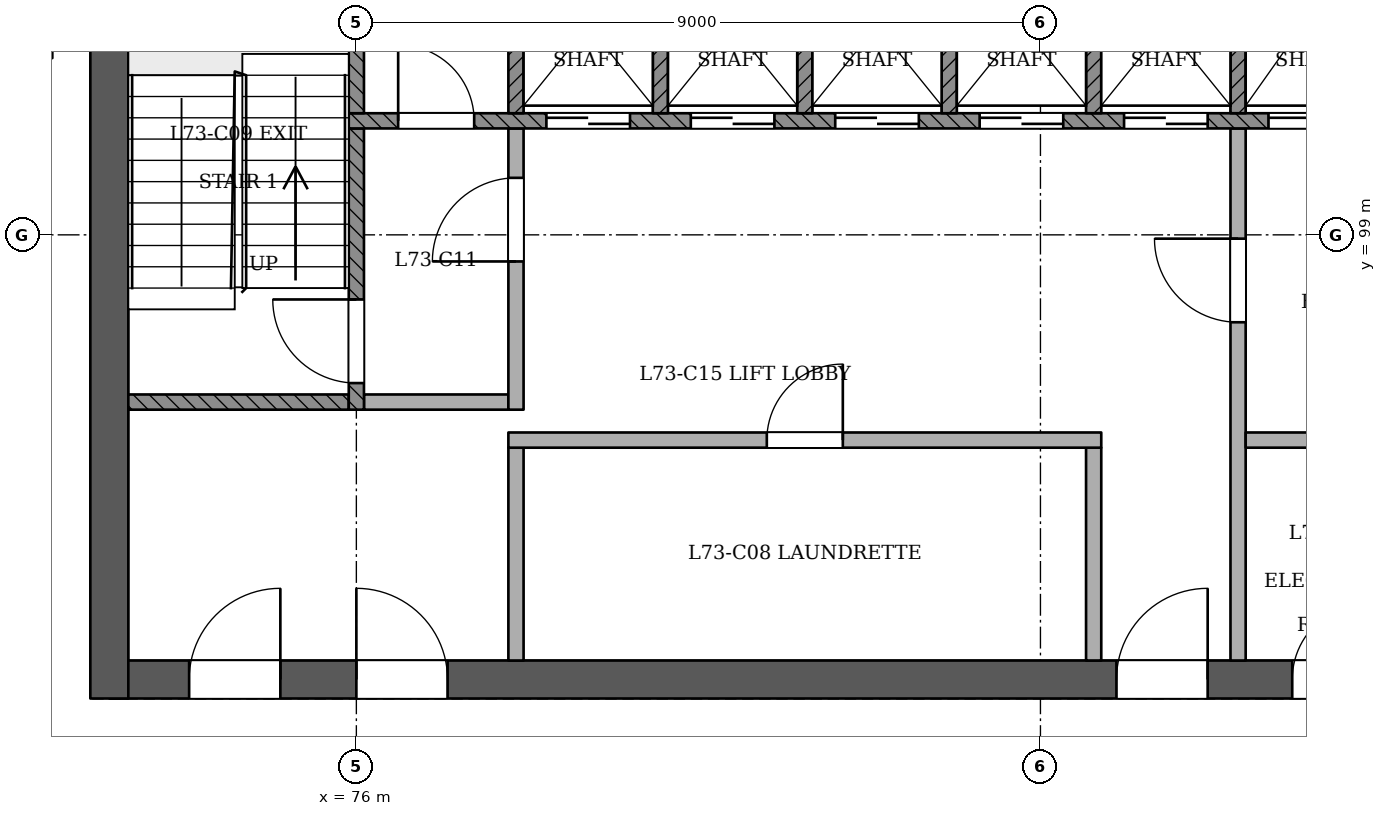
"""IFC4 building model, lengths in metres.
Left out: names, types, materials, properties, quantities, classifications, styles, units other than length and angle.
Written with IfcOpenShell. Run it as: python <this file> out.ifc"""

import sys

from ifc_helpers import new_model, si_unit, direction, frame, frame_2d, origin, place, context, subcontext, project, spatial, rectangle, extrude, element, fill, save


model = new_model("IFC4")
c1 = context("Model", 3, precision=1e-05, world=origin(), true_north=direction((0.0, 1.0)))
c2 = subcontext(c1, "Body", "Model", "MODEL_VIEW")
j1 = project(units=[si_unit("LENGTHUNIT", "METRE"), si_unit("PLANEANGLEUNIT", "RADIAN")], contexts=[c1])
p1 = place(None, origin())
s1 = spatial("IfcSite", under=j1, at=p1, CompositionType="ELEMENT")
p2 = place(p1, origin())
s2 = spatial("IfcBuilding", under=s1, at=p2, CompositionType="ELEMENT")
p3 = place(p2, frame((0.0, 0.0, 282.4)))
s3 = spatial("IfcBuildingStorey", under=s2, at=p3, CompositionType="ELEMENT", Elevation=282.4)
p4 = place(p3, frame((72.75, 93.15, 0.0), z_axis=(0.0, 0.0, 1.0), x_axis=(1.0, 0.0, 0.0)))
e1 = element("IfcWall", 1, at=p4, inside=s3, PredefinedType="SHEAR", context=c2, shape_type="SweptSolid", body=[
    extrude(rectangle(XDim=24.75, YDim=0.5, at=frame_2d((12.375, 0.0))), origin(), (0.0, 0.0, 1.0), 3.6),
])
p5 = place(p4, frame((1.05, 0.0, 0.0)))
e2 = element("IfcOpeningElement", 2, at=p5, cuts=e1, PredefinedType="OPENING", context=c2, shape_type="SweptSolid", body=[
    extrude(rectangle(XDim=1.2, YDim=2.1, at=frame_2d((0.6, 1.05))), frame((0.0, 0.26, 0.0), z_axis=(0.0, -1.0, 0.0), x_axis=(1.0, 0.0, 0.0)), (0.0, 0.0, 1.0), 0.521),
])
p6 = place(p4, frame((3.25, 0.0, 0.0)))
e3 = element("IfcOpeningElement", 3, at=p6, cuts=e1, PredefinedType="OPENING", context=c2, shape_type="SweptSolid", body=[
    extrude(rectangle(XDim=1.2, YDim=2.1, at=frame_2d((0.6, 1.05))), frame((0.0, 0.26, 0.0), z_axis=(0.0, -1.0, 0.0), x_axis=(1.0, 0.0, 0.0)), (0.0, 0.0, 1.0), 0.521),
])
p7 = place(p4, frame((13.25, 0.0, 0.0)))
e4 = element("IfcOpeningElement", 4, at=p7, cuts=e1, PredefinedType="OPENING", context=c2, shape_type="SweptSolid", body=[
    extrude(rectangle(XDim=1.2, YDim=2.1, at=frame_2d((0.6, 1.05))), frame((0.0, 0.26, 0.0), z_axis=(0.0, -1.0, 0.0), x_axis=(1.0, 0.0, 0.0)), (0.0, 0.0, 1.0), 0.521),
])
p8 = place(p4, frame((15.562, 0.0, 0.0)))
e5 = element("IfcOpeningElement", 5, at=p8, cuts=e1, PredefinedType="OPENING", context=c2, shape_type="SweptSolid", body=[
    extrude(rectangle(XDim=1.0, YDim=2.1, at=frame_2d((0.5, 1.05))), frame((0.0, 0.26, 0.0), z_axis=(0.0, -1.0, 0.0), x_axis=(1.0, 0.0, 0.0)), (0.0, 0.0, 1.0), 0.521),
])
p9 = place(p4, frame((19.0, 0.0, 0.0)))
e6 = element("IfcOpeningElement", 6, at=p9, cuts=e1, PredefinedType="OPENING", context=c2, shape_type="SweptSolid", body=[
    extrude(rectangle(XDim=1.0, YDim=2.1, at=frame_2d((0.5, 1.05))), frame((0.0, 0.26, 0.0), z_axis=(0.0, -1.0, 0.0), x_axis=(1.0, 0.0, 0.0)), (0.0, 0.0, 1.0), 0.521),
])
p10 = place(p4, frame((22.538, 0.0, 0.0)))
e7 = element("IfcOpeningElement", 7, at=p10, cuts=e1, PredefinedType="OPENING", context=c2, shape_type="SweptSolid", body=[
    extrude(rectangle(XDim=1.0, YDim=2.1, at=frame_2d((0.5, 1.05))), frame((0.0, 0.26, 0.0), z_axis=(0.0, -1.0, 0.0), x_axis=(1.0, 0.0, 0.0)), (0.0, 0.0, 1.0), 0.521),
])
p11 = place(p3, frame((72.75, 103.65, 0.0), z_axis=(0.0, 0.0, 1.0), x_axis=(0.0, -1.0, 0.0)))
e8 = element("IfcWall", 8, at=p11, inside=s3, PredefinedType="SHEAR", context=c2, shape_type="SweptSolid", body=[
    extrude(rectangle(XDim=10.75, YDim=0.5, at=frame_2d((5.375, 0.0))), origin(), (0.0, 0.0, 1.0), 3.6),
])
p12 = place(p3, frame((72.0, 101.4, 0.0), z_axis=(0.0, 0.0, 1.0), x_axis=(-1.0, 0.0, 0.0)))
e9 = element("IfcWall", 9, at=p12, inside=s3, PredefinedType="PARTITIONING", context=c2, shape_type="SweptSolid", body=[
    extrude(rectangle(XDim=1.8, YDim=0.15, at=frame_2d((0.9, 0.0))), origin(), (0.0, 0.0, 1.0), 3.3),
])
p13 = place(p12, frame((0.55, 0.0, 0.0)))
e10 = element("IfcOpeningElement", 10, at=p13, cuts=e9, PredefinedType="OPENING", context=c2, shape_type="SweptSolid", body=[
    extrude(rectangle(XDim=1.0, YDim=2.1, at=frame_2d((0.5, 1.05))), frame((0.0, 0.085, 0.0), z_axis=(0.0, -1.0, 0.0), x_axis=(1.0, 0.0, 0.0)), (0.0, 0.0, 1.0), 0.171),
])
for number, where, z_axis, x_axis in (
    (11, (78.1, 93.4, 0.0), (0.0, 0.0, 1.0), (0.0, 1.0, 0.0)),
    (12, (85.7, 93.4, 0.0), (0.0, 0.0, 1.0), (0.0, 1.0, 0.0)),
):
    element("IfcWall", number, at=place(p3, frame(where, z_axis=z_axis, x_axis=x_axis)), inside=s3, PredefinedType="PARTITIONING", context=c2, shape_type="SweptSolid", body=[
        extrude(rectangle(XDim=2.8, YDim=0.2, at=frame_2d((1.4, 0.0))), origin(), (0.0, 0.0, 1.0), 3.3),
    ])
p14 = place(p3, frame((87.6, 93.4, 0.0), z_axis=(0.0, 0.0, 1.0), x_axis=(0.0, 1.0, 0.0)))
e13 = element("IfcWall", 13, at=p14, inside=s3, PredefinedType="PARTITIONING", context=c2, shape_type="SweptSolid", body=[
    extrude(rectangle(XDim=7.0, YDim=0.2, at=frame_2d((3.5, 0.0))), origin(), (0.0, 0.0, 1.0), 3.3),
])
p15 = place(p14, frame((4.45, 0.0, 0.0)))
e14 = element("IfcOpeningElement", 14, at=p15, cuts=e13, PredefinedType="OPENING", context=c2, shape_type="SweptSolid", body=[
    extrude(rectangle(XDim=1.1, YDim=2.1, at=frame_2d((0.55, 1.05))), frame((0.0, 0.11, 0.0), z_axis=(0.0, -1.0, 0.0), x_axis=(1.0, 0.0, 0.0)), (0.0, 0.0, 1.0), 0.221),
])
p16 = place(p3, frame((78.0, 96.3, 0.0), z_axis=(0.0, 0.0, 1.0), x_axis=(1.0, 0.0, 0.0)))
e15 = element("IfcWall", 15, at=p16, inside=s3, PredefinedType="PARTITIONING", context=c2, shape_type="SweptSolid", body=[
    extrude(rectangle(XDim=7.8, YDim=0.2, at=frame_2d((3.9, 0.0))), origin(), (0.0, 0.0, 1.0), 3.3),
])
p17 = place(p16, frame((3.4, 0.0, 0.0)))
e16 = element("IfcOpeningElement", 16, at=p17, cuts=e15, PredefinedType="OPENING", context=c2, shape_type="SweptSolid", body=[
    extrude(rectangle(XDim=1.0, YDim=2.1, at=frame_2d((0.5, 1.05))), frame((0.0, 0.11, 0.0), z_axis=(0.0, -1.0, 0.0), x_axis=(1.0, 0.0, 0.0)), (0.0, 0.0, 1.0), 0.221),
])
p18 = place(p3, frame((87.7, 96.3, 0.0), z_axis=(0.0, 0.0, 1.0), x_axis=(1.0, 0.0, 0.0)))
e17 = element("IfcWall", 17, at=p18, inside=s3, PredefinedType="PARTITIONING", context=c2, shape_type="SweptSolid", body=[
    extrude(rectangle(XDim=3.6, YDim=0.2, at=frame_2d((1.8, 0.0))), origin(), (0.0, 0.0, 1.0), 3.3),
])
p19 = place(p3, frame((73.0, 96.8, 0.0), z_axis=(0.0, 0.0, 1.0), x_axis=(1.0, 0.0, 0.0)))
e18 = element("IfcWall", 18, at=p19, inside=s3, PredefinedType="SOLIDWALL", context=c2, shape_type="SweptSolid", body=[
    extrude(rectangle(XDim=2.9, YDim=0.2, at=frame_2d((1.45, 0.0))), origin(), (0.0, 0.0, 1.0), 3.3),
])
p20 = place(p3, frame((76.0, 96.7, 0.0), z_axis=(0.0, 0.0, 1.0), x_axis=(0.0, 1.0, 0.0)))
e19 = element("IfcWall", 19, at=p20, inside=s3, PredefinedType="SOLIDWALL", context=c2, shape_type="SweptSolid", body=[
    extrude(rectangle(XDim=3.7, YDim=0.2, at=frame_2d((1.85, 0.0))), origin(), (0.0, 0.0, 1.0), 3.3),
])
p21 = place(p20, frame((0.35, 0.0, 0.0)))
e20 = element("IfcOpeningElement", 20, at=p21, cuts=e19, PredefinedType="OPENING", context=c2, shape_type="SweptSolid", body=[
    extrude(rectangle(XDim=1.1, YDim=2.1, at=frame_2d((0.55, 1.05))), frame((0.0, 0.11, 0.0), z_axis=(0.0, -1.0, 0.0), x_axis=(1.0, 0.0, 0.0)), (0.0, 0.0, 1.0), 0.221),
])
p22 = place(p3, frame((76.1, 96.8, 0.0), z_axis=(0.0, 0.0, 1.0), x_axis=(1.0, 0.0, 0.0)))
e21 = element("IfcWall", 21, at=p22, inside=s3, PredefinedType="PARTITIONING", context=c2, shape_type="SweptSolid", body=[
    extrude(rectangle(XDim=1.9, YDim=0.2, at=frame_2d((0.95, 0.0))), origin(), (0.0, 0.0, 1.0), 3.3),
])
p23 = place(p3, frame((78.1, 96.7, 0.0), z_axis=(0.0, 0.0, 1.0), x_axis=(0.0, 1.0, 0.0)))
e22 = element("IfcWall", 22, at=p23, inside=s3, PredefinedType="PARTITIONING", context=c2, shape_type="SweptSolid", body=[
    extrude(rectangle(XDim=3.7, YDim=0.2, at=frame_2d((1.85, 0.0))), origin(), (0.0, 0.0, 1.0), 3.3),
])
p24 = place(p23, frame((1.95, 0.0, 0.0)))
e23 = element("IfcOpeningElement", 23, at=p24, cuts=e22, PredefinedType="OPENING", context=c2, shape_type="SweptSolid", body=[
    extrude(rectangle(XDim=1.1, YDim=2.1, at=frame_2d((0.55, 1.05))), frame((0.0, 0.11, 0.0), z_axis=(0.0, -1.0, 0.0), x_axis=(1.0, 0.0, 0.0)), (0.0, 0.0, 1.0), 0.221),
])
p25 = place(p3, frame((75.9, 100.5, 0.0), z_axis=(0.0, 0.0, 1.0), x_axis=(1.0, 0.0, 0.0)))
e24 = element("IfcWall", 24, at=p25, inside=s3, PredefinedType="SOLIDWALL", context=c2, shape_type="SweptSolid", body=[
    extrude(rectangle(XDim=18.2, YDim=0.2, at=frame_2d((9.1, 0.0))), origin(), (0.0, 0.0, 1.0), 3.3),
])
p26 = place(p25, frame((2.6, 0.0, 0.0)))
e25 = element("IfcOpeningElement", 25, at=p26, cuts=e24, PredefinedType="OPENING", context=c2, shape_type="SweptSolid", body=[
    extrude(rectangle(XDim=1.1, YDim=2.1, at=frame_2d((0.55, 1.05))), frame((0.0, 0.11, 0.0), z_axis=(0.0, -1.0, 0.0), x_axis=(1.0, 0.0, 0.0)), (0.0, 0.0, 1.0), 0.221),
])
p27 = place(p25, frame((4.5, 0.0, 0.0)))
e26 = element("IfcOpeningElement", 26, at=p27, cuts=e24, PredefinedType="OPENING", context=c2, shape_type="SweptSolid", body=[
    extrude(rectangle(XDim=1.1, YDim=2.1, at=frame_2d((0.55, 1.05))), frame((0.0, 0.11, 0.0), z_axis=(0.0, -1.0, 0.0), x_axis=(1.0, 0.0, 0.0)), (0.0, 0.0, 1.0), 0.221),
])
p28 = place(p25, frame((6.4, 0.0, 0.0)))
e27 = element("IfcOpeningElement", 27, at=p28, cuts=e24, PredefinedType="OPENING", context=c2, shape_type="SweptSolid", body=[
    extrude(rectangle(XDim=1.1, YDim=2.1, at=frame_2d((0.55, 1.05))), frame((0.0, 0.11, 0.0), z_axis=(0.0, -1.0, 0.0), x_axis=(1.0, 0.0, 0.0)), (0.0, 0.0, 1.0), 0.221),
])
p29 = place(p25, frame((8.3, 0.0, 0.0)))
e28 = element("IfcOpeningElement", 28, at=p29, cuts=e24, PredefinedType="OPENING", context=c2, shape_type="SweptSolid", body=[
    extrude(rectangle(XDim=1.1, YDim=2.1, at=frame_2d((0.55, 1.05))), frame((0.0, 0.11, 0.0), z_axis=(0.0, -1.0, 0.0), x_axis=(1.0, 0.0, 0.0)), (0.0, 0.0, 1.0), 0.221),
])
p30 = place(p25, frame((10.2, 0.0, 0.0)))
e29 = element("IfcOpeningElement", 29, at=p30, cuts=e24, PredefinedType="OPENING", context=c2, shape_type="SweptSolid", body=[
    extrude(rectangle(XDim=1.1, YDim=2.1, at=frame_2d((0.55, 1.05))), frame((0.0, 0.11, 0.0), z_axis=(0.0, -1.0, 0.0), x_axis=(1.0, 0.0, 0.0)), (0.0, 0.0, 1.0), 0.221),
])
p31 = place(p25, frame((12.1, 0.0, 0.0)))
e30 = element("IfcOpeningElement", 30, at=p31, cuts=e24, PredefinedType="OPENING", context=c2, shape_type="SweptSolid", body=[
    extrude(rectangle(XDim=1.1, YDim=2.1, at=frame_2d((0.55, 1.05))), frame((0.0, 0.11, 0.0), z_axis=(0.0, -1.0, 0.0), x_axis=(1.0, 0.0, 0.0)), (0.0, 0.0, 1.0), 0.221),
])
p32 = place(p25, frame((14.0, 0.0, 0.0)))
e31 = element("IfcOpeningElement", 31, at=p32, cuts=e24, PredefinedType="OPENING", context=c2, shape_type="SweptSolid", body=[
    extrude(rectangle(XDim=1.1, YDim=2.1, at=frame_2d((0.55, 1.05))), frame((0.0, 0.11, 0.0), z_axis=(0.0, -1.0, 0.0), x_axis=(1.0, 0.0, 0.0)), (0.0, 0.0, 1.0), 0.221),
])
p33 = place(p25, frame((0.65, 0.0, 0.0)))
e32 = element("IfcOpeningElement", 32, at=p33, cuts=e24, PredefinedType="OPENING", context=c2, shape_type="SweptSolid", body=[
    extrude(rectangle(XDim=1.0, YDim=2.1, at=frame_2d((0.5, 1.05))), frame((0.0, 0.11, 0.0), z_axis=(0.0, -1.0, 0.0), x_axis=(1.0, 0.0, 0.0)), (0.0, 0.0, 1.0), 0.221),
])
p34 = place(p25, frame((16.3, 0.0, 0.0)))
e33 = element("IfcOpeningElement", 33, at=p34, cuts=e24, PredefinedType="OPENING", context=c2, shape_type="SweptSolid", body=[
    extrude(rectangle(XDim=1.0, YDim=2.1, at=frame_2d((0.5, 1.05))), frame((0.0, 0.11, 0.0), z_axis=(0.0, -1.0, 0.0), x_axis=(1.0, 0.0, 0.0)), (0.0, 0.0, 1.0), 0.221),
])
for number, where, z_axis, x_axis in (
    (34, (76.0, 100.6, 0.0), (0.0, 0.0, 1.0), (0.0, 1.0, 0.0)),
    (35, (78.1, 100.6, 0.0), (0.0, 0.0, 1.0), (0.0, 1.0, 0.0)),
    (36, (80.0, 100.6, 0.0), (0.0, 0.0, 1.0), (0.0, 1.0, 0.0)),
    (37, (81.9, 100.6, 0.0), (0.0, 0.0, 1.0), (0.0, 1.0, 0.0)),
    (38, (83.8, 100.6, 0.0), (0.0, 0.0, 1.0), (0.0, 1.0, 0.0)),
    (39, (85.7, 100.6, 0.0), (0.0, 0.0, 1.0), (0.0, 1.0, 0.0)),
    (40, (87.6, 100.6, 0.0), (0.0, 0.0, 1.0), (0.0, 1.0, 0.0)),
):
    element("IfcWall", number, at=place(p3, frame(where, z_axis=z_axis, x_axis=x_axis)), inside=s3, PredefinedType="SOLIDWALL", context=c2, shape_type="SweptSolid", body=[
        extrude(rectangle(XDim=2.8, YDim=0.2, at=frame_2d((1.4, 0.0))), origin(), (0.0, 0.0, 1.0), 3.3),
    ])
p35 = place(p26, origin())
e41 = element("IfcDoor", 41, at=p35, inside=s3, OperationType="SLIDING_TO_RIGHT", PredefinedType="NOTDEFINED", context=c2, shape_type="SweptSolid", body=[
    extrude(rectangle(XDim=1.1, YDim=2.1, at=frame_2d((0.55, 1.05))), frame((0.0, 0.025, 0.0), z_axis=(0.0, -1.0, 0.0), x_axis=(1.0, 0.0, 0.0)), (0.0, 0.0, 1.0), 0.05),
])
fill(e25, e41)
p36 = place(p27, origin())
e42 = element("IfcDoor", 42, at=p36, inside=s3, OperationType="SLIDING_TO_LEFT", PredefinedType="NOTDEFINED", context=c2, shape_type="SweptSolid", body=[
    extrude(rectangle(XDim=1.1, YDim=2.1, at=frame_2d((0.55, 1.05))), frame((0.0, 0.025, 0.0), z_axis=(0.0, -1.0, 0.0), x_axis=(1.0, 0.0, 0.0)), (0.0, 0.0, 1.0), 0.05),
])
fill(e26, e42)
p37 = place(p28, origin())
e43 = element("IfcDoor", 43, at=p37, inside=s3, OperationType="SLIDING_TO_RIGHT", PredefinedType="NOTDEFINED", context=c2, shape_type="SweptSolid", body=[
    extrude(rectangle(XDim=1.1, YDim=2.1, at=frame_2d((0.55, 1.05))), frame((0.0, 0.025, 0.0), z_axis=(0.0, -1.0, 0.0), x_axis=(1.0, 0.0, 0.0)), (0.0, 0.0, 1.0), 0.05),
])
fill(e27, e43)
p38 = place(p29, origin())
e44 = element("IfcDoor", 44, at=p38, inside=s3, OperationType="SLIDING_TO_LEFT", PredefinedType="NOTDEFINED", context=c2, shape_type="SweptSolid", body=[
    extrude(rectangle(XDim=1.1, YDim=2.1, at=frame_2d((0.55, 1.05))), frame((0.0, 0.025, 0.0), z_axis=(0.0, -1.0, 0.0), x_axis=(1.0, 0.0, 0.0)), (0.0, 0.0, 1.0), 0.05),
])
fill(e28, e44)
p39 = place(p30, origin())
e45 = element("IfcDoor", 45, at=p39, inside=s3, OperationType="SLIDING_TO_RIGHT", PredefinedType="NOTDEFINED", context=c2, shape_type="SweptSolid", body=[
    extrude(rectangle(XDim=1.1, YDim=2.1, at=frame_2d((0.55, 1.05))), frame((0.0, 0.025, 0.0), z_axis=(0.0, -1.0, 0.0), x_axis=(1.0, 0.0, 0.0)), (0.0, 0.0, 1.0), 0.05),
])
fill(e29, e45)
p40 = place(p31, origin())
e46 = element("IfcDoor", 46, at=p40, inside=s3, OperationType="SLIDING_TO_RIGHT", PredefinedType="NOTDEFINED", context=c2, shape_type="SweptSolid", body=[
    extrude(rectangle(XDim=1.1, YDim=2.1, at=frame_2d((0.55, 1.05))), frame((0.0, 0.025, 0.0), z_axis=(0.0, -1.0, 0.0), x_axis=(1.0, 0.0, 0.0)), (0.0, 0.0, 1.0), 0.05),
])
fill(e30, e46)
p41 = place(p21, origin())
e47 = element("IfcDoor", 47, at=p41, inside=s3, OperationType="SINGLE_SWING_RIGHT", PredefinedType="NOTDEFINED", context=c2, shape_type="SweptSolid", body=[
    extrude(rectangle(XDim=1.1, YDim=2.1, at=frame_2d((0.55, 1.05))), frame((0.0, 0.025, 0.0), z_axis=(0.0, -1.0, 0.0), x_axis=(1.0, 0.0, 0.0)), (0.0, 0.0, 1.0), 0.05),
])
fill(e20, e47)
p42 = place(p24, origin())
e48 = element("IfcDoor", 48, at=p42, inside=s3, OperationType="SINGLE_SWING_LEFT", PredefinedType="NOTDEFINED", context=c2, shape_type="SweptSolid", body=[
    extrude(rectangle(XDim=1.1, YDim=2.1, at=frame_2d((0.55, 1.05))), frame((0.0, 0.025, 0.0), z_axis=(0.0, -1.0, 0.0), x_axis=(1.0, 0.0, 0.0)), (0.0, 0.0, 1.0), 0.05),
])
fill(e23, e48)
p43 = place(p15, origin())
e49 = element("IfcDoor", 49, at=p43, inside=s3, OperationType="SINGLE_SWING_RIGHT", PredefinedType="NOTDEFINED", context=c2, shape_type="SweptSolid", body=[
    extrude(rectangle(XDim=1.1, YDim=2.1, at=frame_2d((0.55, 1.05))), frame((0.0, 0.025, 0.0), z_axis=(0.0, -1.0, 0.0), x_axis=(1.0, 0.0, 0.0)), (0.0, 0.0, 1.0), 0.05),
])
fill(e14, e49)
p44 = place(p5, origin())
e50 = element("IfcDoor", 50, at=p44, inside=s3, OperationType="SINGLE_SWING_RIGHT", PredefinedType="NOTDEFINED", context=c2, shape_type="SweptSolid", body=[
    extrude(rectangle(XDim=1.2, YDim=2.1, at=frame_2d((0.6, 1.05))), frame((0.0, 0.025, 0.0), z_axis=(0.0, -1.0, 0.0), x_axis=(1.0, 0.0, 0.0)), (0.0, 0.0, 1.0), 0.05),
])
fill(e2, e50)
p45 = place(p6, origin())
e51 = element("IfcDoor", 51, at=p45, inside=s3, OperationType="SINGLE_SWING_LEFT", PredefinedType="NOTDEFINED", context=c2, shape_type="SweptSolid", body=[
    extrude(rectangle(XDim=1.2, YDim=2.1, at=frame_2d((0.6, 1.05))), frame((0.0, 0.025, 0.0), z_axis=(0.0, -1.0, 0.0), x_axis=(1.0, 0.0, 0.0)), (0.0, 0.0, 1.0), 0.05),
])
fill(e3, e51)
p46 = place(p7, origin())
e52 = element("IfcDoor", 52, at=p46, inside=s3, OperationType="SINGLE_SWING_RIGHT", PredefinedType="NOTDEFINED", context=c2, shape_type="SweptSolid", body=[
    extrude(rectangle(XDim=1.2, YDim=2.1, at=frame_2d((0.6, 1.05))), frame((0.0, 0.025, 0.0), z_axis=(0.0, -1.0, 0.0), x_axis=(1.0, 0.0, 0.0)), (0.0, 0.0, 1.0), 0.05),
])
fill(e4, e52)
p47 = place(p33, origin())
e53 = element("IfcDoor", 53, at=p47, inside=s3, OperationType="SINGLE_SWING_LEFT", PredefinedType="NOTDEFINED", context=c2, shape_type="SweptSolid", body=[
    extrude(rectangle(XDim=1.0, YDim=2.1, at=frame_2d((0.5, 1.05))), frame((0.0, 0.025, 0.0), z_axis=(0.0, -1.0, 0.0), x_axis=(1.0, 0.0, 0.0)), (0.0, 0.0, 1.0), 0.05),
])
fill(e32, e53)
p48 = place(p8, origin())
e54 = element("IfcDoor", 54, at=p48, inside=s3, OperationType="SINGLE_SWING_RIGHT", PredefinedType="NOTDEFINED", context=c2, shape_type="SweptSolid", body=[
    extrude(rectangle(XDim=1.0, YDim=2.1, at=frame_2d((0.5, 1.05))), frame((0.0, 0.025, 0.0), z_axis=(0.0, -1.0, 0.0), x_axis=(1.0, 0.0, 0.0)), (0.0, 0.0, 1.0), 0.05),
])
fill(e5, e54)
p49 = place(p17, origin())
e55 = element("IfcDoor", 55, at=p49, inside=s3, OperationType="SINGLE_SWING_RIGHT", PredefinedType="NOTDEFINED", context=c2, shape_type="SweptSolid", body=[
    extrude(rectangle(XDim=1.0, YDim=2.1, at=frame_2d((0.5, 1.05))), frame((0.0, 0.025, 0.0), z_axis=(0.0, -1.0, 0.0), x_axis=(1.0, 0.0, 0.0)), (0.0, 0.0, 1.0), 0.05),
])
fill(e16, e55)
save(model, sys.argv[1])
